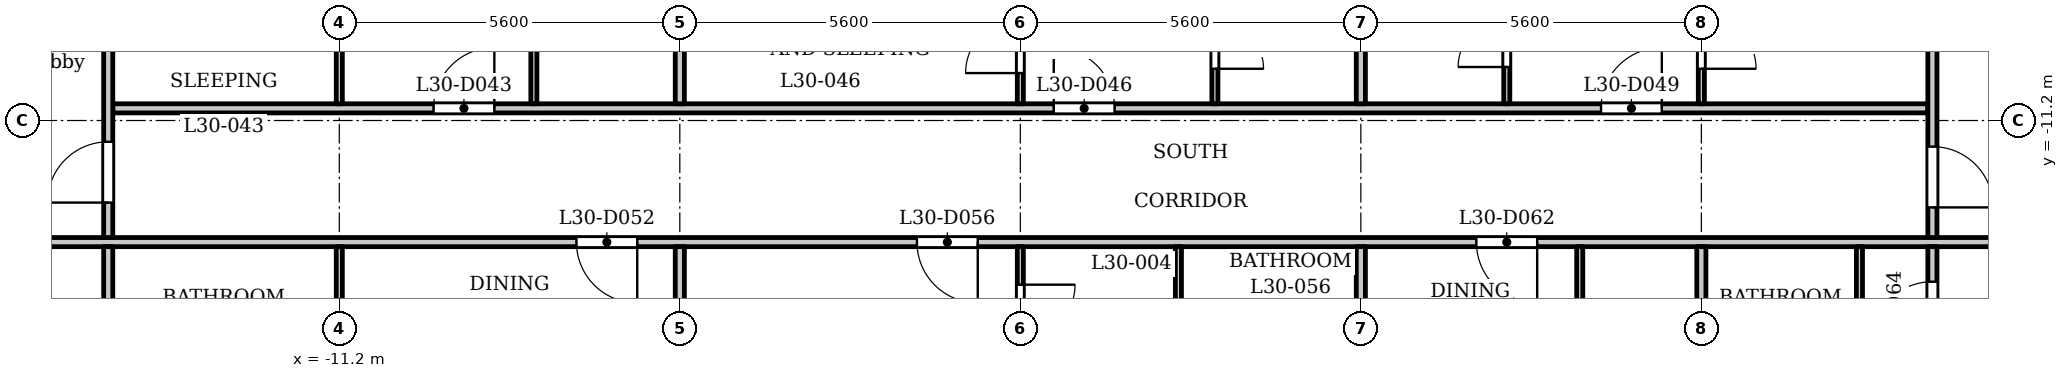
"""IFC4 building model, lengths in metres.
Left out: names, types, materials, properties, quantities, classifications, styles, units other than length and angle.
Written with IfcOpenShell. Run it as: python <this file> out.ifc"""

import sys

from ifc_helpers import new_model, si_unit, direction, frame, frame_2d, origin, place, context, subcontext, project, spatial, rectangle, extrude, element, fill, save


model = new_model("IFC4")
c1 = context("Model", 3, precision=1e-05, world=origin(), true_north=direction((0.0, 1.0)))
c2 = subcontext(c1, "Body", "Model", "MODEL_VIEW")
j1 = project(units=[si_unit("LENGTHUNIT", "METRE"), si_unit("PLANEANGLEUNIT", "RADIAN")], contexts=[c1])
p1 = place(None, origin())
s1 = spatial("IfcSite", under=j1, at=p1, CompositionType="ELEMENT")
p2 = place(p1, origin())
s2 = spatial("IfcBuilding", under=s1, at=p2, CompositionType="ELEMENT")
p3 = place(p2, frame((0.0, 0.0, 118.3)))
s3 = spatial("IfcBuildingStorey", under=s2, at=p3, CompositionType="ELEMENT", Elevation=118.3)
p4 = place(p3, frame((-17.4, -13.2, 0.0), z_axis=(0.0, 0.0, 1.0), x_axis=(1.0, 0.0, 0.0)))
e1 = element("IfcWall", 1, at=p4, inside=s3, PredefinedType="PARTITIONING", context=c2, shape_type="SweptSolid", body=[
    extrude(rectangle(XDim=34.8, YDim=0.15, at=frame_2d((17.4, 0.0))), origin(), (0.0, 0.0, 1.0), 3.2),
])
p5 = place(p4, frame((0.15, 0.0, 0.0)))
e2 = element("IfcOpeningElement", 2, at=p5, cuts=e1, PredefinedType="OPENING", context=c2, shape_type="SweptSolid", body=[
    extrude(rectangle(XDim=1.0, YDim=2.1, at=frame_2d((0.5, 1.05))), frame((0.0, 0.085, 0.0), z_axis=(0.0, -1.0, 0.0), x_axis=(1.0, 0.0, 0.0)), (0.0, 0.0, 1.0), 0.17),
])
p6 = place(p4, frame((33.55, 0.0, 0.0)))
e3 = element("IfcOpeningElement", 3, at=p6, cuts=e1, PredefinedType="OPENING", context=c2, shape_type="SweptSolid", body=[
    extrude(rectangle(XDim=1.0, YDim=2.1, at=frame_2d((0.5, 1.05))), frame((0.0, 0.085, 0.0), z_axis=(0.0, -1.0, 0.0), x_axis=(1.0, 0.0, 0.0)), (0.0, 0.0, 1.0), 0.17),
])
p7 = place(p4, frame((10.1, 0.0, 0.0)))
e4 = element("IfcOpeningElement", 4, at=p7, cuts=e1, PredefinedType="OPENING", context=c2, shape_type="SweptSolid", body=[
    extrude(rectangle(XDim=1.0, YDim=2.1, at=frame_2d((0.5, 1.05))), frame((0.0, 0.085, 0.0), z_axis=(0.0, -1.0, 0.0), x_axis=(1.0, 0.0, 0.0)), (0.0, 0.0, 1.0), 0.17),
])
p8 = place(p4, frame((15.7, 0.0, 0.0)))
e5 = element("IfcOpeningElement", 5, at=p8, cuts=e1, PredefinedType="OPENING", context=c2, shape_type="SweptSolid", body=[
    extrude(rectangle(XDim=1.0, YDim=2.1, at=frame_2d((0.5, 1.05))), frame((0.0, 0.085, 0.0), z_axis=(0.0, -1.0, 0.0), x_axis=(1.0, 0.0, 0.0)), (0.0, 0.0, 1.0), 0.17),
])
p9 = place(p4, frame((24.9, 0.0, 0.0)))
e6 = element("IfcOpeningElement", 6, at=p9, cuts=e1, PredefinedType="OPENING", context=c2, shape_type="SweptSolid", body=[
    extrude(rectangle(XDim=1.0, YDim=2.1, at=frame_2d((0.5, 1.05))), frame((0.0, 0.085, 0.0), z_axis=(0.0, -1.0, 0.0), x_axis=(1.0, 0.0, 0.0)), (0.0, 0.0, 1.0), 0.17),
])
p10 = place(p3, frame((-14.925, -11.0, 0.0), z_axis=(0.0, 0.0, 1.0), x_axis=(1.0, 0.0, 0.0)))
e7 = element("IfcWall", 7, at=p10, inside=s3, PredefinedType="PARTITIONING", context=c2, shape_type="SweptSolid", body=[
    extrude(rectangle(XDim=29.85, YDim=0.15, at=frame_2d((14.925, 0.0))), origin(), (0.0, 0.0, 1.0), 3.2),
])
p11 = place(p10, frame((5.275, 0.0, 0.0)))
e8 = element("IfcOpeningElement", 8, at=p11, cuts=e7, PredefinedType="OPENING", context=c2, shape_type="SweptSolid", body=[
    extrude(rectangle(XDim=1.0, YDim=2.1, at=frame_2d((0.5, 1.05))), frame((0.0, 0.085, 0.0), z_axis=(0.0, -1.0, 0.0), x_axis=(1.0, 0.0, 0.0)), (0.0, 0.0, 1.0), 0.17),
])
p12 = place(p10, frame((15.475, 0.0, 0.0)))
e9 = element("IfcOpeningElement", 9, at=p12, cuts=e7, PredefinedType="OPENING", context=c2, shape_type="SweptSolid", body=[
    extrude(rectangle(XDim=1.0, YDim=2.1, at=frame_2d((0.5, 1.05))), frame((0.0, 0.085, 0.0), z_axis=(0.0, -1.0, 0.0), x_axis=(1.0, 0.0, 0.0)), (0.0, 0.0, 1.0), 0.17),
])
p13 = place(p10, frame((24.475, 0.0, 0.0)))
e10 = element("IfcOpeningElement", 10, at=p13, cuts=e7, PredefinedType="OPENING", context=c2, shape_type="SweptSolid", body=[
    extrude(rectangle(XDim=1.0, YDim=2.1, at=frame_2d((0.5, 1.05))), frame((0.0, 0.085, 0.0), z_axis=(0.0, -1.0, 0.0), x_axis=(1.0, 0.0, 0.0)), (0.0, 0.0, 1.0), 0.17),
])
p14 = place(p3, frame((-15.0, -15.325, 0.0), z_axis=(0.0, 0.0, 1.0), x_axis=(0.0, 1.0, 0.0)))
e11 = element("IfcWall", 11, at=p14, inside=s3, PredefinedType="PARTITIONING", context=c2, shape_type="SweptSolid", body=[
    extrude(rectangle(XDim=2.05, YDim=0.15, at=frame_2d((1.025, 0.0))), origin(), (0.0, 0.0, 1.0), 3.2),
])
p15 = place(p3, frame((-15.0, -13.125, 0.0), z_axis=(0.0, 0.0, 1.0), x_axis=(0.0, 1.0, 0.0)))
e12 = element("IfcWall", 12, at=p15, inside=s3, PredefinedType="PARTITIONING", context=c2, shape_type="SweptSolid", body=[
    extrude(rectangle(XDim=6.356, YDim=0.15, at=frame_2d((3.178, 0.0))), origin(), (0.0, 0.0, 1.0), 3.2),
])
p16 = place(p15, frame((0.575, 0.0, 0.0)))
e13 = element("IfcOpeningElement", 13, at=p16, cuts=e12, PredefinedType="OPENING", context=c2, shape_type="SweptSolid", body=[
    extrude(rectangle(XDim=1.0, YDim=2.1, at=frame_2d((0.5, 1.05))), frame((0.0, 0.085, 0.0), z_axis=(0.0, -1.0, 0.0), x_axis=(1.0, 0.0, 0.0)), (0.0, 0.0, 1.0), 0.17),
])
p17 = place(p3, frame((-11.2, -16.15, 0.0), z_axis=(0.0, 0.0, 1.0), x_axis=(0.0, 1.0, 0.0)))
e14 = element("IfcWall", 14, at=p17, inside=s3, PredefinedType="PARTITIONING", context=c2, shape_type="SweptSolid", body=[
    extrude(rectangle(XDim=2.875, YDim=0.1, at=frame_2d((1.438, 0.0))), origin(), (0.0, 0.0, 1.0), 3.2),
])
p18 = place(p3, frame((-11.2, -10.925, 0.0), z_axis=(0.0, 0.0, 1.0), x_axis=(0.0, 1.0, 0.0)))
e15 = element("IfcWall", 15, at=p18, inside=s3, PredefinedType="PARTITIONING", context=c2, shape_type="SweptSolid", body=[
    extrude(rectangle(XDim=3.605, YDim=0.1, at=frame_2d((1.802, 0.0))), origin(), (0.0, 0.0, 1.0), 3.2),
])
p19 = place(p18, frame((1.005, 0.0, 0.0)))
e16 = element("IfcOpeningElement", 16, at=p19, cuts=e15, PredefinedType="OPENING", context=c2, shape_type="SweptSolid", body=[
    extrude(rectangle(XDim=0.9, YDim=2.1, at=frame_2d((0.45, 1.05))), frame((0.0, 0.06, 0.0), z_axis=(0.0, -1.0, 0.0), x_axis=(1.0, 0.0, 0.0)), (0.0, 0.0, 1.0), 0.12),
])
p20 = place(p3, frame((-8.0, -10.925, 0.0), z_axis=(0.0, 0.0, 1.0), x_axis=(0.0, 1.0, 0.0)))
e17 = element("IfcWall", 17, at=p20, inside=s3, PredefinedType="PARTITIONING", context=c2, shape_type="SweptSolid", body=[
    extrude(rectangle(XDim=3.605, YDim=0.1, at=frame_2d((1.802, 0.0))), origin(), (0.0, 0.0, 1.0), 3.2),
])
p21 = place(p20, frame((2.326, 0.0, 0.0)))
e18 = element("IfcOpeningElement", 18, at=p21, cuts=e17, PredefinedType="OPENING", context=c2, shape_type="SweptSolid", body=[
    extrude(rectangle(XDim=0.8, YDim=2.1, at=frame_2d((0.4, 1.05))), frame((0.0, 0.06, 0.0), z_axis=(0.0, -1.0, 0.0), x_axis=(1.0, 0.0, 0.0)), (0.0, 0.0, 1.0), 0.12),
])
p22 = place(p3, frame((-5.6, -16.15, 0.0), z_axis=(0.0, 0.0, 1.0), x_axis=(0.0, 1.0, 0.0)))
e19 = element("IfcWall", 19, at=p22, inside=s3, PredefinedType="PARTITIONING", context=c2, shape_type="SweptSolid", body=[
    extrude(rectangle(XDim=2.875, YDim=0.15, at=frame_2d((1.438, 0.0))), origin(), (0.0, 0.0, 1.0), 3.2),
])
p23 = place(p3, frame((-5.6, -10.925, 0.0), z_axis=(0.0, 0.0, 1.0), x_axis=(0.0, 1.0, 0.0)))
e20 = element("IfcWall", 20, at=p23, inside=s3, PredefinedType="PARTITIONING", context=c2, shape_type="SweptSolid", body=[
    extrude(rectangle(XDim=3.605, YDim=0.15, at=frame_2d((1.802, 0.0))), origin(), (0.0, 0.0, 1.0), 3.2),
])
p24 = place(p3, frame((0.0, -16.15, 0.0), z_axis=(0.0, 0.0, 1.0), x_axis=(0.0, 1.0, 0.0)))
e21 = element("IfcWall", 21, at=p24, inside=s3, PredefinedType="PARTITIONING", context=c2, shape_type="SweptSolid", body=[
    extrude(rectangle(XDim=2.875, YDim=0.1, at=frame_2d((1.438, 0.0))), origin(), (0.0, 0.0, 1.0), 3.2),
])
p25 = place(p24, frame((1.35, 0.0, 0.0)))
e22 = element("IfcOpeningElement", 22, at=p25, cuts=e21, PredefinedType="OPENING", context=c2, shape_type="SweptSolid", body=[
    extrude(rectangle(XDim=0.9, YDim=2.1, at=frame_2d((0.45, 1.05))), frame((0.0, 0.06, 0.0), z_axis=(0.0, -1.0, 0.0), x_axis=(1.0, 0.0, 0.0)), (0.0, 0.0, 1.0), 0.12),
])
p26 = place(p3, frame((0.0, -10.925, 0.0), z_axis=(0.0, 0.0, 1.0), x_axis=(0.0, 1.0, 0.0)))
e23 = element("IfcWall", 23, at=p26, inside=s3, PredefinedType="PARTITIONING", context=c2, shape_type="SweptSolid", body=[
    extrude(rectangle(XDim=3.605, YDim=0.1, at=frame_2d((1.802, 0.0))), origin(), (0.0, 0.0, 1.0), 3.2),
])
p27 = place(p26, frame((0.505, 0.0, 0.0)))
e24 = element("IfcOpeningElement", 24, at=p27, cuts=e23, PredefinedType="OPENING", context=c2, shape_type="SweptSolid", body=[
    extrude(rectangle(XDim=0.9, YDim=2.1, at=frame_2d((0.45, 1.05))), frame((0.0, 0.06, 0.0), z_axis=(0.0, -1.0, 0.0), x_axis=(1.0, 0.0, 0.0)), (0.0, 0.0, 1.0), 0.12),
])
p28 = place(p3, frame((2.6, -16.15, 0.0), z_axis=(0.0, 0.0, 1.0), x_axis=(0.0, 1.0, 0.0)))
e25 = element("IfcWall", 25, at=p28, inside=s3, PredefinedType="PARTITIONING", context=c2, shape_type="SweptSolid", body=[
    extrude(rectangle(XDim=2.875, YDim=0.1, at=frame_2d((1.438, 0.0))), origin(), (0.0, 0.0, 1.0), 3.2),
])
p29 = place(p3, frame((3.2, -10.925, 0.0), z_axis=(0.0, 0.0, 1.0), x_axis=(0.0, 1.0, 0.0)))
e26 = element("IfcWall", 26, at=p29, inside=s3, PredefinedType="PARTITIONING", context=c2, shape_type="SweptSolid", body=[
    extrude(rectangle(XDim=3.605, YDim=0.1, at=frame_2d((1.802, 0.0))), origin(), (0.0, 0.0, 1.0), 3.2),
])
p30 = place(p29, frame((0.576, 0.0, 0.0)))
e27 = element("IfcOpeningElement", 27, at=p30, cuts=e26, PredefinedType="OPENING", context=c2, shape_type="SweptSolid", body=[
    extrude(rectangle(XDim=0.8, YDim=2.1, at=frame_2d((0.4, 1.05))), frame((0.0, 0.06, 0.0), z_axis=(0.0, -1.0, 0.0), x_axis=(1.0, 0.0, 0.0)), (0.0, 0.0, 1.0), 0.12),
])
p31 = place(p3, frame((5.6, -16.15, 0.0), z_axis=(0.0, 0.0, 1.0), x_axis=(0.0, 1.0, 0.0)))
e28 = element("IfcWall", 28, at=p31, inside=s3, PredefinedType="PARTITIONING", context=c2, shape_type="SweptSolid", body=[
    extrude(rectangle(XDim=2.875, YDim=0.15, at=frame_2d((1.438, 0.0))), origin(), (0.0, 0.0, 1.0), 3.2),
])
p32 = place(p3, frame((5.6, -10.925, 0.0), z_axis=(0.0, 0.0, 1.0), x_axis=(0.0, 1.0, 0.0)))
e29 = element("IfcWall", 29, at=p32, inside=s3, PredefinedType="PARTITIONING", context=c2, shape_type="SweptSolid", body=[
    extrude(rectangle(XDim=3.605, YDim=0.15, at=frame_2d((1.802, 0.0))), origin(), (0.0, 0.0, 1.0), 3.2),
])
p33 = place(p3, frame((8.0, -10.925, 0.0), z_axis=(0.0, 0.0, 1.0), x_axis=(0.0, 1.0, 0.0)))
e30 = element("IfcWall", 30, at=p33, inside=s3, PredefinedType="PARTITIONING", context=c2, shape_type="SweptSolid", body=[
    extrude(rectangle(XDim=3.605, YDim=0.1, at=frame_2d((1.802, 0.0))), origin(), (0.0, 0.0, 1.0), 3.2),
])
p34 = place(p33, frame((0.605, 0.0, 0.0)))
e31 = element("IfcOpeningElement", 31, at=p34, cuts=e30, PredefinedType="OPENING", context=c2, shape_type="SweptSolid", body=[
    extrude(rectangle(XDim=0.8, YDim=2.1, at=frame_2d((0.4, 1.05))), frame((0.0, 0.06, 0.0), z_axis=(0.0, -1.0, 0.0), x_axis=(1.0, 0.0, 0.0)), (0.0, 0.0, 1.0), 0.12),
])
p35 = place(p3, frame((9.2, -16.15, 0.0), z_axis=(0.0, 0.0, 1.0), x_axis=(0.0, 1.0, 0.0)))
e32 = element("IfcWall", 32, at=p35, inside=s3, PredefinedType="PARTITIONING", context=c2, shape_type="SweptSolid", body=[
    extrude(rectangle(XDim=2.875, YDim=0.1, at=frame_2d((1.438, 0.0))), origin(), (0.0, 0.0, 1.0), 3.2),
])
p36 = place(p3, frame((11.2, -10.925, 0.0), z_axis=(0.0, 0.0, 1.0), x_axis=(0.0, 1.0, 0.0)))
e33 = element("IfcWall", 33, at=p36, inside=s3, PredefinedType="PARTITIONING", context=c2, shape_type="SweptSolid", body=[
    extrude(rectangle(XDim=3.605, YDim=0.1, at=frame_2d((1.802, 0.0))), origin(), (0.0, 0.0, 1.0), 3.2),
])
p37 = place(p36, frame((0.576, 0.0, 0.0)))
e34 = element("IfcOpeningElement", 34, at=p37, cuts=e33, PredefinedType="OPENING", context=c2, shape_type="SweptSolid", body=[
    extrude(rectangle(XDim=0.9, YDim=2.1, at=frame_2d((0.45, 1.05))), frame((0.0, 0.06, 0.0), z_axis=(0.0, -1.0, 0.0), x_axis=(1.0, 0.0, 0.0)), (0.0, 0.0, 1.0), 0.12),
])
p38 = place(p3, frame((11.2, -16.15, 0.0), z_axis=(0.0, 0.0, 1.0), x_axis=(0.0, 1.0, 0.0)))
e35 = element("IfcWall", 35, at=p38, inside=s3, PredefinedType="PARTITIONING", context=c2, shape_type="SweptSolid", body=[
    extrude(rectangle(XDim=2.875, YDim=0.15, at=frame_2d((1.438, 0.0))), origin(), (0.0, 0.0, 1.0), 3.2),
])
p39 = place(p3, frame((13.8, -16.15, 0.0), z_axis=(0.0, 0.0, 1.0), x_axis=(0.0, 1.0, 0.0)))
e36 = element("IfcWall", 36, at=p39, inside=s3, PredefinedType="PARTITIONING", context=c2, shape_type="SweptSolid", body=[
    extrude(rectangle(XDim=2.875, YDim=0.1, at=frame_2d((1.438, 0.0))), origin(), (0.0, 0.0, 1.0), 3.2),
])
p40 = place(p3, frame((15.0, -15.325, 0.0), z_axis=(0.0, 0.0, 1.0), x_axis=(0.0, 1.0, 0.0)))
e37 = element("IfcWall", 37, at=p40, inside=s3, PredefinedType="PARTITIONING", context=c2, shape_type="SweptSolid", body=[
    extrude(rectangle(XDim=2.05, YDim=0.15, at=frame_2d((1.025, 0.0))), origin(), (0.0, 0.0, 1.0), 3.2),
])
p41 = place(p40, frame((0.474, 0.0, 0.0)))
e38 = element("IfcOpeningElement", 38, at=p41, cuts=e37, PredefinedType="OPENING", context=c2, shape_type="SweptSolid", body=[
    extrude(rectangle(XDim=1.0, YDim=2.1, at=frame_2d((0.5, 1.05))), frame((0.0, 0.085, 0.0), z_axis=(0.0, -1.0, 0.0), x_axis=(1.0, 0.0, 0.0)), (0.0, 0.0, 1.0), 0.17),
])
p42 = place(p3, frame((15.0, -13.125, 0.0), z_axis=(0.0, 0.0, 1.0), x_axis=(0.0, 1.0, 0.0)))
e39 = element("IfcWall", 39, at=p42, inside=s3, PredefinedType="PARTITIONING", context=c2, shape_type="SweptSolid", body=[
    extrude(rectangle(XDim=6.356, YDim=0.15, at=frame_2d((3.178, 0.0))), origin(), (0.0, 0.0, 1.0), 3.2),
])
p43 = place(p42, frame((0.496, 0.0, 0.0)))
e40 = element("IfcOpeningElement", 40, at=p43, cuts=e39, PredefinedType="OPENING", context=c2, shape_type="SweptSolid", body=[
    extrude(rectangle(XDim=1.0, YDim=2.1, at=frame_2d((0.5, 1.05))), frame((0.0, 0.085, 0.0), z_axis=(0.0, -1.0, 0.0), x_axis=(1.0, 0.0, 0.0)), (0.0, 0.0, 1.0), 0.17),
])
p44 = place(p16, origin())
e41 = element("IfcDoor", 41, at=p44, inside=s3, OperationType="SINGLE_SWING_RIGHT", PredefinedType="DOOR", context=c2, shape_type="SweptSolid", body=[
    extrude(rectangle(XDim=1.0, YDim=2.1, at=frame_2d((0.5, 1.05))), frame((0.0, 0.025, 0.0), z_axis=(0.0, -1.0, 0.0), x_axis=(1.0, 0.0, 0.0)), (0.0, 0.0, 1.0), 0.05),
])
fill(e13, e41)
p45 = place(p43, origin())
e42 = element("IfcDoor", 42, at=p45, inside=s3, OperationType="SINGLE_SWING_LEFT", PredefinedType="DOOR", context=c2, shape_type="SweptSolid", body=[
    extrude(rectangle(XDim=1.0, YDim=2.1, at=frame_2d((0.5, 1.05))), frame((0.0, 0.025, 0.0), z_axis=(0.0, -1.0, 0.0), x_axis=(1.0, 0.0, 0.0)), (0.0, 0.0, 1.0), 0.05),
])
fill(e40, e42)
p46 = place(p11, origin())
e43 = element("IfcDoor", 43, at=p46, inside=s3, OperationType="SINGLE_SWING_LEFT", PredefinedType="DOOR", context=c2, shape_type="SweptSolid", body=[
    extrude(rectangle(XDim=1.0, YDim=2.1, at=frame_2d((0.5, 1.05))), frame((0.0, 0.025, 0.0), z_axis=(0.0, -1.0, 0.0), x_axis=(1.0, 0.0, 0.0)), (0.0, 0.0, 1.0), 0.05),
])
fill(e8, e43)
p47 = place(p12, origin())
e44 = element("IfcDoor", 44, at=p47, inside=s3, OperationType="SINGLE_SWING_RIGHT", PredefinedType="DOOR", context=c2, shape_type="SweptSolid", body=[
    extrude(rectangle(XDim=1.0, YDim=2.1, at=frame_2d((0.5, 1.05))), frame((0.0, 0.025, 0.0), z_axis=(0.0, -1.0, 0.0), x_axis=(1.0, 0.0, 0.0)), (0.0, 0.0, 1.0), 0.05),
])
fill(e9, e44)
p48 = place(p30, origin())
e45 = element("IfcDoor", 45, at=p48, inside=s3, OperationType="SINGLE_SWING_LEFT", PredefinedType="DOOR", context=c2, shape_type="SweptSolid", body=[
    extrude(rectangle(XDim=0.8, YDim=2.1, at=frame_2d((0.4, 1.05))), frame((0.0, 0.025, 0.0), z_axis=(0.0, -1.0, 0.0), x_axis=(1.0, 0.0, 0.0)), (0.0, 0.0, 1.0), 0.05),
])
fill(e27, e45)
p49 = place(p27, origin())
e46 = element("IfcDoor", 46, at=p49, inside=s3, OperationType="SINGLE_SWING_RIGHT", PredefinedType="DOOR", context=c2, shape_type="SweptSolid", body=[
    extrude(rectangle(XDim=0.9, YDim=2.1, at=frame_2d((0.45, 1.05))), frame((0.0, 0.025, 0.0), z_axis=(0.0, -1.0, 0.0), x_axis=(1.0, 0.0, 0.0)), (0.0, 0.0, 1.0), 0.05),
])
fill(e24, e46)
p50 = place(p13, origin())
e47 = element("IfcDoor", 47, at=p50, inside=s3, OperationType="SINGLE_SWING_LEFT", PredefinedType="DOOR", context=c2, shape_type="SweptSolid", body=[
    extrude(rectangle(XDim=1.0, YDim=2.1, at=frame_2d((0.5, 1.05))), frame((0.0, 0.025, 0.0), z_axis=(0.0, -1.0, 0.0), x_axis=(1.0, 0.0, 0.0)), (0.0, 0.0, 1.0), 0.05),
])
fill(e10, e47)
p51 = place(p34, origin())
e48 = element("IfcDoor", 48, at=p51, inside=s3, OperationType="SINGLE_SWING_RIGHT", PredefinedType="DOOR", context=c2, shape_type="SweptSolid", body=[
    extrude(rectangle(XDim=0.8, YDim=2.1, at=frame_2d((0.4, 1.05))), frame((0.0, 0.025, 0.0), z_axis=(0.0, -1.0, 0.0), x_axis=(1.0, 0.0, 0.0)), (0.0, 0.0, 1.0), 0.05),
])
fill(e31, e48)
p52 = place(p37, origin())
e49 = element("IfcDoor", 49, at=p52, inside=s3, OperationType="SINGLE_SWING_LEFT", PredefinedType="DOOR", context=c2, shape_type="SweptSolid", body=[
    extrude(rectangle(XDim=0.9, YDim=2.1, at=frame_2d((0.45, 1.05))), frame((0.0, 0.025, 0.0), z_axis=(0.0, -1.0, 0.0), x_axis=(1.0, 0.0, 0.0)), (0.0, 0.0, 1.0), 0.05),
])
fill(e34, e49)
p53 = place(p7, origin())
e50 = element("IfcDoor", 50, at=p53, inside=s3, OperationType="SINGLE_SWING_RIGHT", PredefinedType="DOOR", context=c2, shape_type="SweptSolid", body=[
    extrude(rectangle(XDim=1.0, YDim=2.1, at=frame_2d((0.5, 1.05))), frame((0.0, 0.025, 0.0), z_axis=(0.0, -1.0, 0.0), x_axis=(1.0, 0.0, 0.0)), (0.0, 0.0, 1.0), 0.05),
])
fill(e4, e50)
p54 = place(p8, origin())
e51 = element("IfcDoor", 51, at=p54, inside=s3, OperationType="SINGLE_SWING_RIGHT", PredefinedType="DOOR", context=c2, shape_type="SweptSolid", body=[
    extrude(rectangle(XDim=1.0, YDim=2.1, at=frame_2d((0.5, 1.05))), frame((0.0, 0.025, 0.0), z_axis=(0.0, -1.0, 0.0), x_axis=(1.0, 0.0, 0.0)), (0.0, 0.0, 1.0), 0.05),
])
fill(e5, e51)
p55 = place(p25, origin())
e52 = element("IfcDoor", 52, at=p55, inside=s3, OperationType="SINGLE_SWING_RIGHT", PredefinedType="DOOR", context=c2, shape_type="SweptSolid", body=[
    extrude(rectangle(XDim=0.9, YDim=2.1, at=frame_2d((0.45, 1.05))), frame((0.0, 0.025, 0.0), z_axis=(0.0, -1.0, 0.0), x_axis=(1.0, 0.0, 0.0)), (0.0, 0.0, 1.0), 0.05),
])
fill(e22, e52)
p56 = place(p9, origin())
e53 = element("IfcDoor", 53, at=p56, inside=s3, OperationType="SINGLE_SWING_RIGHT", PredefinedType="DOOR", context=c2, shape_type="SweptSolid", body=[
    extrude(rectangle(XDim=1.0, YDim=2.1, at=frame_2d((0.5, 1.05))), frame((0.0, 0.025, 0.0), z_axis=(0.0, -1.0, 0.0), x_axis=(1.0, 0.0, 0.0)), (0.0, 0.0, 1.0), 0.05),
])
fill(e6, e53)
p57 = place(p41, origin())
e54 = element("IfcDoor", 54, at=p57, inside=s3, OperationType="SINGLE_SWING_RIGHT", PredefinedType="DOOR", context=c2, shape_type="SweptSolid", body=[
    extrude(rectangle(XDim=1.0, YDim=2.1, at=frame_2d((0.5, 1.05))), frame((0.0, 0.025, 0.0), z_axis=(0.0, -1.0, 0.0), x_axis=(1.0, 0.0, 0.0)), (0.0, 0.0, 1.0), 0.05),
])
fill(e38, e54)
save(model, sys.argv[1])
